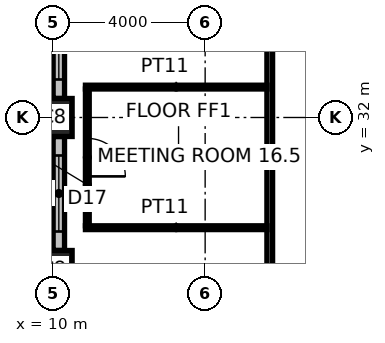
"""IFC4 building model, lengths in metres.
Left out: names, types, materials, properties, quantities, classifications, styles, units other than length and angle.
Written with IfcOpenShell. Run it as: python <this file> out.ifc"""

import sys

from ifc_helpers import new_model, si_unit, direction, frame, frame_2d, origin, origin_2d, place, context, subcontext, project, spatial, rectangle, hollow_rectangle, extrude, element, fill, save


model = new_model("IFC4")
c1 = context("Model", 3, precision=1e-05, world=origin(), true_north=direction((0.0, 1.0)))
c2 = subcontext(c1, "Body", "Model", "MODEL_VIEW")
j1 = project(units=[si_unit("LENGTHUNIT", "METRE"), si_unit("PLANEANGLEUNIT", "RADIAN")], contexts=[c1])
p1 = place(None, origin())
s1 = spatial("IfcSite", under=j1, at=p1, CompositionType="ELEMENT")
p2 = place(p1, origin())
s2 = spatial("IfcBuilding", under=s1, at=p2, CompositionType="ELEMENT")
p3 = place(p2, frame((0.0, 0.0, 266.2)))
s3 = spatial("IfcBuildingStorey", under=s2, at=p3, CompositionType="ELEMENT", Elevation=266.2)
for number, where, z_axis, x_axis in (
    (1, (10.0, 28.0, 0.0), (0.0, 0.0, 1.0), (1.0, 0.0, 0.0)),
    (2, (10.0, 32.0, 0.0), (0.0, 0.0, 1.0), (1.0, 0.0, 0.0)),
):
    element("IfcColumn", number, at=place(p3, frame(where, z_axis=z_axis, x_axis=x_axis)), inside=s3, PredefinedType="COLUMN", context=c2, shape_type="SweptSolid", body=[
        extrude(hollow_rectangle(XDim=1.0, YDim=1.0, WallThickness=0.125, at=origin_2d()), origin(), (0.0, 0.0, 1.0), 4.0),
    ])
p4 = place(p3, frame((15.7, 15.625, 0.0), z_axis=(0.0, 0.0, 1.0), x_axis=(0.0, 1.0, 0.0)))
e3 = element("IfcWall", 3, at=p4, inside=s3, PredefinedType="PARTITIONING", context=c2, shape_type="SweptSolid", body=[
    extrude(rectangle(XDim=22.75, YDim=0.15, at=frame_2d((11.375, 0.0))), origin(), (0.0, 0.0, 1.0), 3.85),
])
p5 = place(p4, frame((10.475, 0.0, 0.0)))
e4 = element("IfcOpeningElement", 4, at=p5, cuts=e3, PredefinedType="OPENING", context=c2, shape_type="SweptSolid", body=[
    extrude(rectangle(XDim=1.8, YDim=2.4, at=frame_2d((0.9, 1.2))), frame((0.0, 0.085, 0.0), z_axis=(0.0, -1.0, 0.0), x_axis=(1.0, 0.0, 0.0)), (0.0, 0.0, 1.0), 0.17),
])
for number, where, z_axis, x_axis in (
    (5, (10.85, 29.1, 0.0), (0.0, 0.0, 1.0), (1.0, 0.0, 0.0)),
    (6, (10.85, 32.8, 0.0), (0.0, 0.0, 1.0), (1.0, 0.0, 0.0)),
):
    element("IfcWall", number, at=place(p3, frame(where, z_axis=z_axis, x_axis=x_axis)), inside=s3, PredefinedType="PARTITIONING", context=c2, shape_type="SweptSolid", body=[
        extrude(rectangle(XDim=4.775, YDim=0.1, at=frame_2d((2.387, 0.0))), origin(), (0.0, 0.0, 1.0), 3.85),
    ])
p6 = place(p3, frame((10.9, 29.15, 0.0), z_axis=(0.0, 0.0, 1.0), x_axis=(0.0, 1.0, 0.0)))
e7 = element("IfcWall", 7, at=p6, inside=s3, PredefinedType="PARTITIONING", context=c2, shape_type="SweptSolid", body=[
    extrude(rectangle(XDim=3.6, YDim=0.1, at=frame_2d((1.8, 0.0))), origin(), (0.0, 0.0, 1.0), 3.85),
])
p7 = place(p6, frame((1.3, 0.0, 0.0)))
e8 = element("IfcOpeningElement", 8, at=p7, cuts=e7, PredefinedType="OPENING", context=c2, shape_type="SweptSolid", body=[
    extrude(rectangle(XDim=1.0, YDim=2.2, at=frame_2d((0.5, 1.1))), frame((0.0, 0.06, 0.0), z_axis=(0.0, -1.0, 0.0), x_axis=(1.0, 0.0, 0.0)), (0.0, 0.0, 1.0), 0.12),
])
p8 = place(p3, frame((10.15, 31.5, 0.0), z_axis=(0.0, 0.0, 1.0), x_axis=(0.0, -1.0, 0.0)))
e9 = element("IfcWall", 9, at=p8, inside=s3, PredefinedType="ELEMENTEDWALL", context=c2, shape_type="SweptSolid", body=[
    extrude(rectangle(XDim=3.0, YDim=0.3, at=frame_2d((1.5, 0.0))), origin(), (0.0, 0.0, 1.0), 2.65),
])
p9 = place(p8, frame((0.5, 0.0, 0.8)))
e10 = element("IfcOpeningElement", 10, at=p9, cuts=e9, PredefinedType="OPENING", context=c2, shape_type="SweptSolid", body=[
    extrude(rectangle(XDim=2.0, YDim=1.8, at=frame_2d((1.0, 0.9))), frame((0.0, 0.16, 0.0), z_axis=(0.0, -1.0, 0.0), x_axis=(1.0, 0.0, 0.0)), (0.0, 0.0, 1.0), 0.32),
])
p10 = place(p3, frame((10.15, 35.5, 0.0), z_axis=(0.0, 0.0, 1.0), x_axis=(0.0, -1.0, 0.0)))
e11 = element("IfcWall", 11, at=p10, inside=s3, PredefinedType="ELEMENTEDWALL", context=c2, shape_type="SweptSolid", body=[
    extrude(rectangle(XDim=3.0, YDim=0.3, at=frame_2d((1.5, 0.0))), origin(), (0.0, 0.0, 1.0), 2.65),
])
p11 = place(p10, frame((0.5, 0.0, 0.8)))
e12 = element("IfcOpeningElement", 12, at=p11, cuts=e11, PredefinedType="OPENING", context=c2, shape_type="SweptSolid", body=[
    extrude(rectangle(XDim=2.0, YDim=1.8, at=frame_2d((1.0, 0.9))), frame((0.0, 0.16, 0.0), z_axis=(0.0, -1.0, 0.0), x_axis=(1.0, 0.0, 0.0)), (0.0, 0.0, 1.0), 0.32),
])
p12 = place(p7, frame((1.0, 0.0, 0.0), z_axis=(0.0, 0.0, 1.0), x_axis=(-1.0, 0.0, 0.0)))
e13 = element("IfcDoor", 13, at=p12, inside=s3, OperationType="SINGLE_SWING_RIGHT", PredefinedType="DOOR", context=c2, shape_type="SweptSolid", body=[
    extrude(rectangle(XDim=1.0, YDim=2.2, at=frame_2d((0.5, 1.1))), frame((0.0, 0.025, 0.0), z_axis=(0.0, -1.0, 0.0), x_axis=(1.0, 0.0, 0.0)), (0.0, 0.0, 1.0), 0.05),
])
fill(e8, e13)
p13 = place(p9, origin())
e14 = element("IfcWindow", 14, at=p13, inside=s3, PartitioningType="SINGLE_PANEL", PredefinedType="WINDOW", context=c2, shape_type="SweptSolid", body=[
    extrude(rectangle(XDim=2.0, YDim=1.8, at=frame_2d((1.0, 0.9))), frame((0.0, 0.03, 0.0), z_axis=(0.0, -1.0, 0.0), x_axis=(1.0, 0.0, 0.0)), (0.0, 0.0, 1.0), 0.06),
])
fill(e10, e14)
p14 = place(p11, origin())
e15 = element("IfcWindow", 15, at=p14, inside=s3, PartitioningType="SINGLE_PANEL", PredefinedType="WINDOW", context=c2, shape_type="SweptSolid", body=[
    extrude(rectangle(XDim=2.0, YDim=1.8, at=frame_2d((1.0, 0.9))), frame((0.0, 0.03, 0.0), z_axis=(0.0, -1.0, 0.0), x_axis=(1.0, 0.0, 0.0)), (0.0, 0.0, 1.0), 0.06),
])
fill(e12, e15)
save(model, sys.argv[1])
